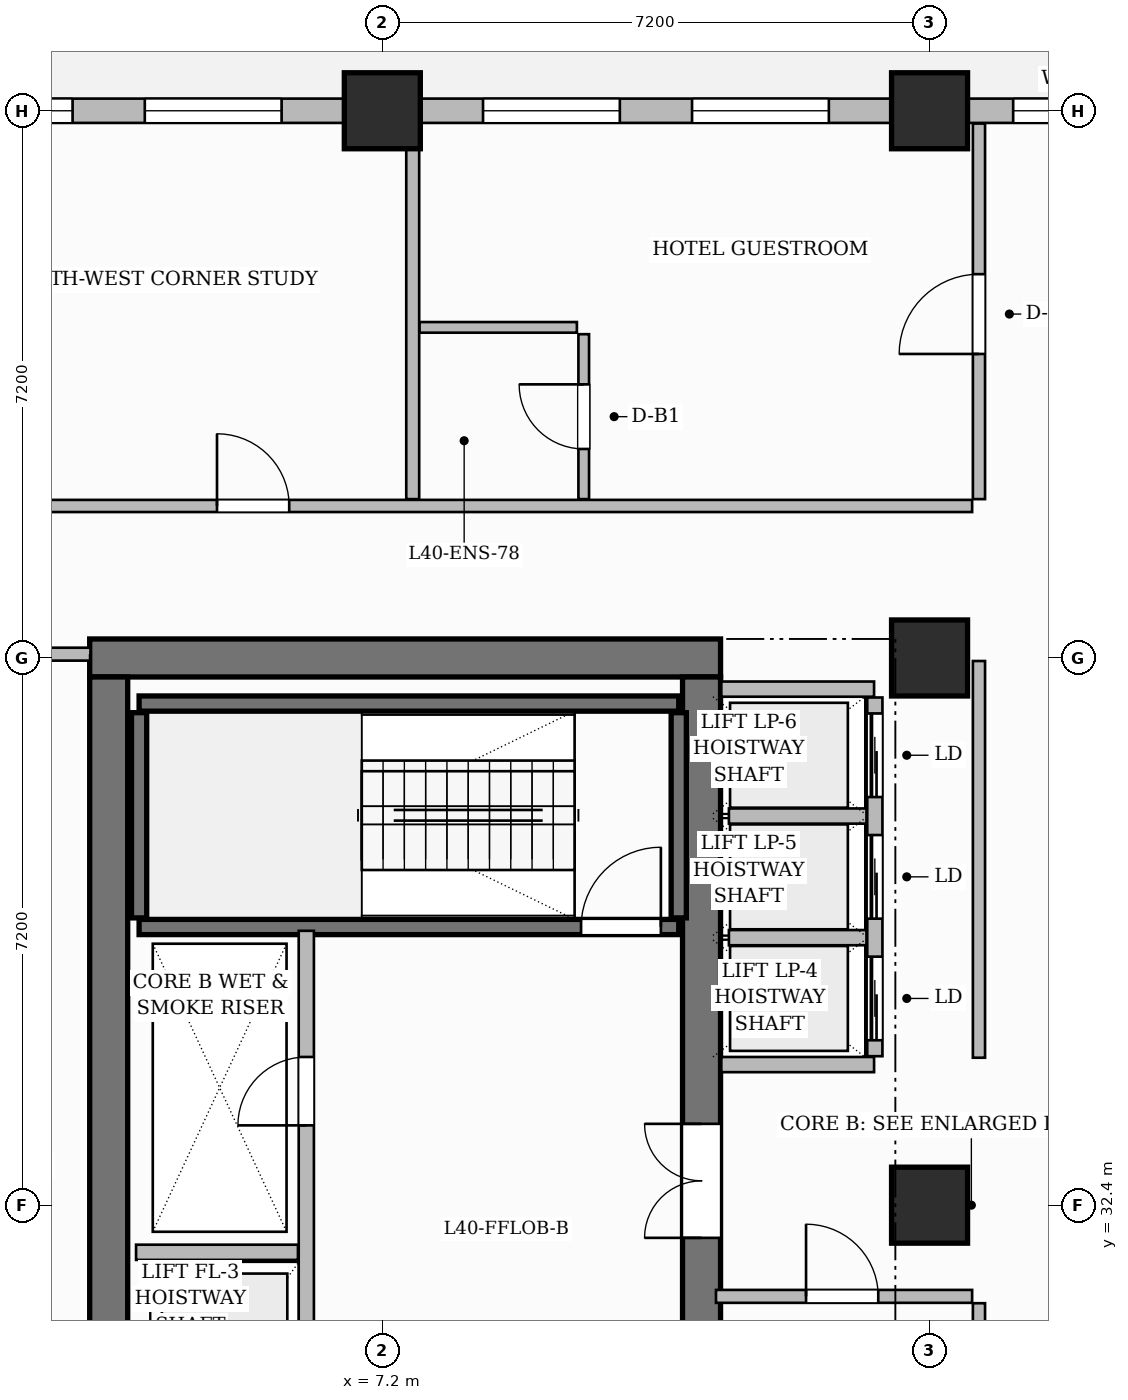
"""IFC4 building model, lengths in metres.
Left out: names, types, materials, properties, quantities, classifications, styles, units other than length and angle.
Written with IfcOpenShell. Run it as: python <this file> out.ifc"""

import sys

from ifc_helpers import new_model, si_unit, direction, frame, frame_2d, origin, origin_2d, place, context, subcontext, project, spatial, rectangle, extrude, source, transform, mapped, element, fill, save


model = new_model("IFC4")
c1 = context("Model", 3, precision=1e-05, world=origin(), true_north=direction((0.0, 1.0)))
c2 = subcontext(c1, "Body", "Model", "MODEL_VIEW")
j1 = project(units=[si_unit("LENGTHUNIT", "METRE"), si_unit("PLANEANGLEUNIT", "RADIAN")], contexts=[c1])
p1 = place(None, origin())
s1 = spatial("IfcSite", under=j1, at=p1, CompositionType="ELEMENT")
p2 = place(p1, origin())
s2 = spatial("IfcBuilding", under=s1, at=p2, CompositionType="ELEMENT")
p3 = place(p2, frame((0.0, 0.0, 161.85)))
s3 = spatial("IfcBuildingStorey", under=s2, at=p3, CompositionType="ELEMENT", Elevation=161.85)
p4 = place(p3, frame((3.35, 39.6, 0.0), z_axis=(0.0, 0.0, 1.0), x_axis=(1.0, 0.0, 0.0)))
e1 = element("IfcWall", 1, at=p4, inside=s3, PredefinedType="SHEAR", context=c2, shape_type="SweptSolid", body=[
    extrude(rectangle(XDim=8.3, YDim=0.5, at=frame_2d((4.15, 0.0))), origin(), (0.0, 0.0, 1.0), 3.85),
])
p5 = place(p3, frame((3.6, 25.45, 0.0), z_axis=(0.0, 0.0, 1.0), x_axis=(0.0, 1.0, 0.0)))
e2 = element("IfcWall", 2, at=p5, inside=s3, PredefinedType="SHEAR", context=c2, shape_type="SweptSolid", body=[
    extrude(rectangle(XDim=13.9, YDim=0.5, at=frame_2d((6.95, 0.0))), origin(), (0.0, 0.0, 1.0), 3.85),
])
p6 = place(p3, frame((11.4, 25.45, 0.0), z_axis=(0.0, 0.0, 1.0), x_axis=(0.0, 1.0, 0.0)))
e3 = element("IfcWall", 3, at=p6, inside=s3, PredefinedType="SHEAR", context=c2, shape_type="SweptSolid", body=[
    extrude(rectangle(XDim=13.9, YDim=0.5, at=frame_2d((6.95, 0.0))), origin(), (0.0, 0.0, 1.0), 3.85),
])
p7 = place(p6, frame((6.52, 0.0, 0.0)))
e4 = element("IfcOpeningElement", 4, at=p7, cuts=e3, PredefinedType="OPENING", context=c2, shape_type="SweptSolid", body=[
    extrude(rectangle(XDim=1.5, YDim=2.2, at=frame_2d((0.75, 1.1))), frame((0.0, 0.26, 0.0), z_axis=(0.0, -1.0, 0.0), x_axis=(1.0, 0.0, 0.0)), (0.0, 0.0, 1.0), 0.52),
])
m1 = source(origin(), c2, "Body", "SweptSolid", [
    extrude(rectangle(XDim=1.0, YDim=1.0, at=origin_2d()), origin(), (0.0, 0.0, 1.0), 3.85),
])
for number, where, z_axis, x_axis in (
    (5, (7.2, 46.8, 0.0), (0.0, 0.0, 1.0), (1.0, 0.0, 0.0)),
    (6, (14.4, 32.4, 0.0), (0.0, 0.0, 1.0), (1.0, 0.0, 0.0)),
    (7, (14.4, 39.6, 0.0), (0.0, 0.0, 1.0), (1.0, 0.0, 0.0)),
    (8, (14.4, 46.8, 0.0), (0.0, 0.0, 1.0), (1.0, 0.0, 0.0)),
):
    element("IfcColumn", number, at=place(p3, frame(where, z_axis=z_axis, x_axis=x_axis)), inside=s3, PredefinedType="COLUMN", context=c2, shape_type="MappedRepresentation", body=[
        mapped(m1, transform((0.0, 0.0, 0.0), scale=1.0)),
    ])
p8 = place(p3, frame((4.0, 39.0, 0.0), z_axis=(0.0, 0.0, 1.0), x_axis=(1.0, 0.0, 0.0)))
e9 = element("IfcWall", 9, at=p8, inside=s3, PredefinedType="SHEAR", context=c2, shape_type="SweptSolid", body=[
    extrude(rectangle(XDim=7.1, YDim=0.2, at=frame_2d((3.55, 0.0))), origin(), (0.0, 0.0, 1.0), 3.85),
])
for number, where, z_axis, x_axis in (
    (10, (4.0, 36.18, 0.0), (0.0, 0.0, 1.0), (0.0, 1.0, 0.0)),
    (11, (11.1, 36.18, 0.0), (0.0, 0.0, 1.0), (0.0, 1.0, 0.0)),
):
    element("IfcWall", number, at=place(p3, frame(where, z_axis=z_axis, x_axis=x_axis)), inside=s3, PredefinedType="SHEAR", context=c2, shape_type="SweptSolid", body=[
        extrude(rectangle(XDim=2.7, YDim=0.2, at=frame_2d((1.35, 0.0))), origin(), (0.0, 0.0, 1.0), 3.85),
    ])
p9 = place(p3, frame((4.0, 36.06, 0.0), z_axis=(0.0, 0.0, 1.0), x_axis=(1.0, 0.0, 0.0)))
e12 = element("IfcWall", 12, at=p9, inside=s3, PredefinedType="SHEAR", context=c2, shape_type="SweptSolid", body=[
    extrude(rectangle(XDim=7.1, YDim=0.2, at=frame_2d((3.55, 0.0))), origin(), (0.0, 0.0, 1.0), 3.85),
])
p10 = place(p9, frame((5.815, 0.0, 0.0)))
e13 = element("IfcOpeningElement", 13, at=p10, cuts=e12, PredefinedType="OPENING", context=c2, shape_type="SweptSolid", body=[
    extrude(rectangle(XDim=1.05, YDim=2.2, at=frame_2d((0.525, 1.1))), frame((0.0, 0.11, 0.0), z_axis=(0.0, -1.0, 0.0), x_axis=(1.0, 0.0, 0.0)), (0.0, 0.0, 1.0), 0.22),
])
p11 = place(p3, frame((6.2, 28.79, 0.0), z_axis=(0.0, 0.0, 1.0), x_axis=(0.0, 1.0, 0.0)))
e14 = element("IfcWall", 14, at=p11, inside=s3, PredefinedType="PARTITIONING", context=c2, shape_type="SweptSolid", body=[
    extrude(rectangle(XDim=7.22, YDim=0.2, at=frame_2d((3.61, 0.0))), origin(), (0.0, 0.0, 1.0), 3.6),
])
p12 = place(p11, frame((4.66, 0.0, 0.0)))
e15 = element("IfcOpeningElement", 15, at=p12, cuts=e14, PredefinedType="OPENING", context=c2, shape_type="SweptSolid", body=[
    extrude(rectangle(XDim=0.9, YDim=2.1, at=frame_2d((0.45, 1.05))), frame((0.0, 0.11, 0.0), z_axis=(0.0, -1.0, 0.0), x_axis=(1.0, 0.0, 0.0)), (0.0, 0.0, 1.0), 0.22),
])
p13 = place(p11, frame((0.96, 0.0, 0.0)))
e16 = element("IfcOpeningElement", 16, at=p13, cuts=e14, PredefinedType="OPENING", context=c2, shape_type="SweptSolid", body=[
    extrude(rectangle(XDim=1.1, YDim=2.2, at=frame_2d((0.55, 1.1))), frame((0.0, 0.11, 0.0), z_axis=(0.0, -1.0, 0.0), x_axis=(1.0, 0.0, 0.0)), (0.0, 0.0, 1.0), 0.22),
])
p14 = place(p3, frame((3.96, 31.78, 0.0), z_axis=(0.0, 0.0, 1.0), x_axis=(1.0, 0.0, 0.0)))
e17 = element("IfcWall", 17, at=p14, inside=s3, PredefinedType="PARTITIONING", context=c2, shape_type="SweptSolid", body=[
    extrude(rectangle(XDim=2.13, YDim=0.2, at=frame_2d((1.065, 0.0))), origin(), (0.0, 0.0, 1.0), 3.6),
])
for number, where, z_axis, x_axis in (
    (18, (11.66, 34.25, 0.0), (0.0, 0.0, 1.0), (1.0, 0.0, 0.0)),
    (19, (11.66, 39.19, 0.0), (0.0, 0.0, 1.0), (1.0, 0.0, 0.0)),
):
    element("IfcWall", number, at=place(p3, frame(where, z_axis=z_axis, x_axis=x_axis)), inside=s3, PredefinedType="PARTITIONING", context=c2, shape_type="SweptSolid", body=[
        extrude(rectangle(XDim=2.01, YDim=0.2, at=frame_2d((1.005, 0.0))), origin(), (0.0, 0.0, 1.0), 3.6),
    ])
p15 = place(p3, frame((13.68, 34.36, 0.0), z_axis=(0.0, 0.0, 1.0), x_axis=(0.0, 1.0, 0.0)))
e20 = element("IfcWall", 20, at=p15, inside=s3, PredefinedType="PARTITIONING", context=c2, shape_type="SweptSolid", body=[
    extrude(rectangle(XDim=4.72, YDim=0.2, at=frame_2d((2.36, 0.0))), origin(), (0.0, 0.0, 1.0), 3.6),
])
p16 = place(p15, frame((0.21, 0.0, 0.0)))
e21 = element("IfcOpeningElement", 21, at=p16, cuts=e20, PredefinedType="OPENING", context=c2, shape_type="SweptSolid", body=[
    extrude(rectangle(XDim=1.1, YDim=2.2, at=frame_2d((0.55, 1.1))), frame((0.0, 0.11, 0.0), z_axis=(0.0, -1.0, 0.0), x_axis=(1.0, 0.0, 0.0)), (0.0, 0.0, 1.0), 0.22),
])
p17 = place(p15, frame((1.81, 0.0, 0.0)))
e22 = element("IfcOpeningElement", 22, at=p17, cuts=e20, PredefinedType="OPENING", context=c2, shape_type="SweptSolid", body=[
    extrude(rectangle(XDim=1.1, YDim=2.2, at=frame_2d((0.55, 1.1))), frame((0.0, 0.11, 0.0), z_axis=(0.0, -1.0, 0.0), x_axis=(1.0, 0.0, 0.0)), (0.0, 0.0, 1.0), 0.22),
])
p18 = place(p15, frame((3.41, 0.0, 0.0)))
e23 = element("IfcOpeningElement", 23, at=p18, cuts=e20, PredefinedType="OPENING", context=c2, shape_type="SweptSolid", body=[
    extrude(rectangle(XDim=1.1, YDim=2.2, at=frame_2d((0.55, 1.1))), frame((0.0, 0.11, 0.0), z_axis=(0.0, -1.0, 0.0), x_axis=(1.0, 0.0, 0.0)), (0.0, 0.0, 1.0), 0.22),
])
for number, where, z_axis, x_axis in (
    (24, (11.76, 35.92, 0.0), (0.0, 0.0, 1.0), (1.0, 0.0, 0.0)),
    (25, (11.76, 37.52, 0.0), (0.0, 0.0, 1.0), (1.0, 0.0, 0.0)),
):
    element("IfcWall", number, at=place(p3, frame(where, z_axis=z_axis, x_axis=x_axis)), inside=s3, PredefinedType="PARTITIONING", context=c2, shape_type="SweptSolid", body=[
        extrude(rectangle(XDim=1.81, YDim=0.2, at=frame_2d((0.905, 0.0))), origin(), (0.0, 0.0, 1.0), 3.6),
    ])
p19 = place(p3, frame((0.24, 39.65, 0.0), z_axis=(0.0, 0.0, 1.0), x_axis=(1.0, 0.0, 0.0)))
e26 = element("IfcWall", 26, at=p19, inside=s3, PredefinedType="PARTITIONING", context=c2, shape_type="SweptSolid", body=[
    extrude(rectangle(XDim=3.12, YDim=0.17, at=frame_2d((1.56, 0.0))), origin(), (0.0, 0.0, 1.0), 3.6),
])
p20 = place(p19, frame((1.11, 0.0, 0.0)))
e27 = element("IfcOpeningElement", 27, at=p20, cuts=e26, PredefinedType="OPENING", context=c2, shape_type="SweptSolid", body=[
    extrude(rectangle(XDim=0.9, YDim=2.15, at=frame_2d((0.45, 1.075))), frame((0.0, 0.095, 0.0), z_axis=(0.0, -1.0, 0.0), x_axis=(1.0, 0.0, 0.0)), (0.0, 0.0, 1.0), 0.19),
])
p21 = place(p3, frame((15.05, 34.34, 0.0), z_axis=(0.0, 0.0, 1.0), x_axis=(0.0, 1.0, 0.0)))
e28 = element("IfcWall", 28, at=p21, inside=s3, PredefinedType="PARTITIONING", context=c2, shape_type="SweptSolid", body=[
    extrude(rectangle(XDim=5.22, YDim=0.16, at=frame_2d((2.61, 0.0))), origin(), (0.0, 0.0, 1.0), 3.6),
])
p22 = place(p3, frame((15.05, 41.69, 0.0), z_axis=(0.0, 0.0, 1.0), x_axis=(0.0, 1.0, 0.0)))
e29 = element("IfcWall", 29, at=p22, inside=s3, PredefinedType="PARTITIONING", context=c2, shape_type="SweptSolid", body=[
    extrude(rectangle(XDim=4.942, YDim=0.16, at=frame_2d((2.471, 0.0))), origin(), (0.0, 0.0, 1.0), 3.6),
])
p23 = place(p22, frame((1.91, 0.0, 0.0)))
e30 = element("IfcOpeningElement", 30, at=p23, cuts=e29, PredefinedType="OPENING", context=c2, shape_type="SweptSolid", body=[
    extrude(rectangle(XDim=1.05, YDim=2.25, at=frame_2d((0.525, 1.125))), frame((0.0, 0.09, 0.0), z_axis=(0.0, -1.0, 0.0), x_axis=(1.0, 0.0, 0.0)), (0.0, 0.0, 1.0), 0.18),
])
p24 = place(p3, frame((7.6, 41.69, 0.0), z_axis=(0.0, 0.0, 1.0), x_axis=(0.0, 1.0, 0.0)))
e31 = element("IfcWall", 31, at=p24, inside=s3, PredefinedType="PARTITIONING", context=c2, shape_type="SweptSolid", body=[
    extrude(rectangle(XDim=4.87, YDim=0.17, at=frame_2d((2.435, 0.0))), origin(), (0.0, 0.0, 1.0), 3.6),
])
p25 = place(p3, frame((0.168, 41.6, 0.0), z_axis=(0.0, 0.0, 1.0), x_axis=(1.0, 0.0, 0.0)))
e32 = element("IfcWall", 32, at=p25, inside=s3, PredefinedType="PARTITIONING", context=c2, shape_type="SweptSolid", body=[
    extrude(rectangle(XDim=14.792, YDim=0.16, at=frame_2d((7.396, 0.0))), origin(), (0.0, 0.0, 1.0), 3.085),
])
p26 = place(p25, frame((4.857, 0.0, 0.0)))
e33 = element("IfcOpeningElement", 33, at=p26, cuts=e32, PredefinedType="OPENING", context=c2, shape_type="SweptSolid", body=[
    extrude(rectangle(XDim=0.95, YDim=2.15, at=frame_2d((0.475, 1.075))), frame((0.0, 0.09, 0.0), z_axis=(0.0, -1.0, 0.0), x_axis=(1.0, 0.0, 0.0)), (0.0, 0.0, 1.0), 0.18),
])
p27 = place(p3, frame((7.69, 43.95, 0.0), z_axis=(0.0, 0.0, 1.0), x_axis=(1.0, 0.0, 0.0)))
e34 = element("IfcWall", 34, at=p27, inside=s3, PredefinedType="PARTITIONING", context=c2, shape_type="SweptSolid", body=[
    extrude(rectangle(XDim=2.07, YDim=0.14, at=frame_2d((1.035, 0.0))), origin(), (0.0, 0.0, 1.0), 3.085),
])
p28 = place(p3, frame((9.85, 41.69, 0.0), z_axis=(0.0, 0.0, 1.0), x_axis=(0.0, 1.0, 0.0)))
e35 = element("IfcWall", 35, at=p28, inside=s3, PredefinedType="PARTITIONING", context=c2, shape_type="SweptSolid", body=[
    extrude(rectangle(XDim=2.17, YDim=0.14, at=frame_2d((1.085, 0.0))), origin(), (0.0, 0.0, 1.0), 3.6),
])
p29 = place(p28, frame((0.66, 0.0, 0.0)))
e36 = element("IfcOpeningElement", 36, at=p29, cuts=e35, PredefinedType="OPENING", context=c2, shape_type="SweptSolid", body=[
    extrude(rectangle(XDim=0.85, YDim=2.1, at=frame_2d((0.425, 1.05))), frame((0.0, 0.08, 0.0), z_axis=(0.0, -1.0, 0.0), x_axis=(1.0, 0.0, 0.0)), (0.0, 0.0, 1.0), 0.16),
])
p30 = place(p3, frame((15.05, 25.39, 0.0), z_axis=(0.0, 0.0, 1.0), x_axis=(0.0, 1.0, 0.0)))
e37 = element("IfcWall", 37, at=p30, inside=s3, PredefinedType="PARTITIONING", context=c2, shape_type="SweptSolid", body=[
    extrude(rectangle(XDim=5.72, YDim=0.16, at=frame_2d((2.86, 0.0))), origin(), (0.0, 0.0, 1.0), 3.6),
])
p31 = place(p3, frame((11.59, 31.2, 0.0), z_axis=(0.0, 0.0, 1.0), x_axis=(1.0, 0.0, 0.0)))
e38 = element("IfcWall", 38, at=p31, inside=s3, PredefinedType="PARTITIONING", context=c2, shape_type="SweptSolid", body=[
    extrude(rectangle(XDim=3.37, YDim=0.17, at=frame_2d((1.685, 0.0))), origin(), (0.0, 0.0, 1.0), 3.6),
])
p32 = place(p31, frame((1.185, 0.0, 0.0)))
e39 = element("IfcOpeningElement", 39, at=p32, cuts=e38, PredefinedType="OPENING", context=c2, shape_type="SweptSolid", body=[
    extrude(rectangle(XDim=0.95, YDim=2.15, at=frame_2d((0.475, 1.075))), frame((0.0, 0.095, 0.0), z_axis=(0.0, -1.0, 0.0), x_axis=(1.0, 0.0, 0.0)), (0.0, 0.0, 1.0), 0.19),
])
p33 = place(p3, frame((0.0, 46.8, 0.0), z_axis=(0.0, 0.0, 1.0), x_axis=(1.0, 0.0, 0.0)))
e40 = element("IfcWall", 40, at=p33, inside=s3, PredefinedType="SOLIDWALL", context=c2, shape_type="SweptSolid", body=[
    extrude(rectangle(XDim=18.0, YDim=0.32, at=frame_2d((9.0, 0.0))), origin(), (0.0, 0.0, 1.0), 3.085),
])
p34 = place(p33, frame((1.325, 0.0, 0.8)))
e41 = element("IfcOpeningElement", 41, at=p34, cuts=e40, PredefinedType="OPENING", context=c2, shape_type="SweptSolid", body=[
    extrude(rectangle(XDim=1.8, YDim=1.85, at=frame_2d((0.9, 0.925))), frame((0.0, 0.17, 0.0), z_axis=(0.0, -1.0, 0.0), x_axis=(1.0, 0.0, 0.0)), (0.0, 0.0, 1.0), 0.34),
])
p35 = place(p33, frame((4.075, 0.0, 0.8)))
e42 = element("IfcOpeningElement", 42, at=p35, cuts=e40, PredefinedType="OPENING", context=c2, shape_type="SweptSolid", body=[
    extrude(rectangle(XDim=1.8, YDim=1.85, at=frame_2d((0.9, 0.925))), frame((0.0, 0.17, 0.0), z_axis=(0.0, -1.0, 0.0), x_axis=(1.0, 0.0, 0.0)), (0.0, 0.0, 1.0), 0.34),
])
p36 = place(p33, frame((8.525, 0.0, 0.8)))
e43 = element("IfcOpeningElement", 43, at=p36, cuts=e40, PredefinedType="OPENING", context=c2, shape_type="SweptSolid", body=[
    extrude(rectangle(XDim=1.8, YDim=1.85, at=frame_2d((0.9, 0.925))), frame((0.0, 0.17, 0.0), z_axis=(0.0, -1.0, 0.0), x_axis=(1.0, 0.0, 0.0)), (0.0, 0.0, 1.0), 0.34),
])
p37 = place(p33, frame((11.275, 0.0, 0.8)))
e44 = element("IfcOpeningElement", 44, at=p37, cuts=e40, PredefinedType="OPENING", context=c2, shape_type="SweptSolid", body=[
    extrude(rectangle(XDim=1.8, YDim=1.85, at=frame_2d((0.9, 0.925))), frame((0.0, 0.17, 0.0), z_axis=(0.0, -1.0, 0.0), x_axis=(1.0, 0.0, 0.0)), (0.0, 0.0, 1.0), 0.34),
])
p38 = place(p33, frame((15.5, 0.0, 0.8)))
e45 = element("IfcOpeningElement", 45, at=p38, cuts=e40, PredefinedType="OPENING", context=c2, shape_type="SweptSolid", body=[
    extrude(rectangle(XDim=1.4, YDim=1.85, at=frame_2d((0.7, 0.925))), frame((0.0, 0.17, 0.0), z_axis=(0.0, -1.0, 0.0), x_axis=(1.0, 0.0, 0.0)), (0.0, 0.0, 1.0), 0.34),
])
m2 = source(origin(), c2, "Body", "SweptSolid", [
    extrude(rectangle(XDim=1.05, YDim=2.2, at=frame_2d((0.525, 1.1))), frame((0.0, 0.025, 0.0), z_axis=(0.0, -1.0, 0.0), x_axis=(1.0, 0.0, 0.0)), (0.0, 0.0, 1.0), 0.05),
])
p39 = place(p10, origin())
e46 = element("IfcDoor", 46, at=p39, inside=s3, OperationType="SINGLE_SWING_RIGHT", PredefinedType="DOOR", context=c2, shape_type="MappedRepresentation", body=[
    mapped(m2, transform((0.0, 0.0, 0.0), scale=1.0)),
])
fill(e13, e46)
m3 = source(origin(), c2, "Body", "SweptSolid", [
    extrude(rectangle(XDim=0.9, YDim=2.1, at=frame_2d((0.45, 1.05))), frame((0.0, 0.025, 0.0), z_axis=(0.0, -1.0, 0.0), x_axis=(1.0, 0.0, 0.0)), (0.0, 0.0, 1.0), 0.05),
])
p40 = place(p12, origin())
e47 = element("IfcDoor", 47, at=p40, inside=s3, OperationType="SINGLE_SWING_LEFT", PredefinedType="DOOR", context=c2, shape_type="MappedRepresentation", body=[
    mapped(m3, transform((0.0, 0.0, 0.0), scale=1.0)),
])
fill(e15, e47)
m4 = source(origin(), c2, "Body", "SweptSolid", [
    extrude(rectangle(XDim=1.5, YDim=2.2, at=frame_2d((0.75, 1.1))), frame((0.0, 0.025, 0.0), z_axis=(0.0, -1.0, 0.0), x_axis=(1.0, 0.0, 0.0)), (0.0, 0.0, 1.0), 0.05),
])
p41 = place(p7, origin())
e48 = element("IfcDoor", 48, at=p41, inside=s3, OperationType="DOUBLE_DOOR_SINGLE_SWING", PredefinedType="DOOR", context=c2, shape_type="MappedRepresentation", body=[
    mapped(m4, transform((0.0, 0.0, 0.0), scale=1.0)),
])
fill(e4, e48)
m5 = source(origin(), c2, "Body", "SweptSolid", [
    extrude(rectangle(XDim=0.95, YDim=2.15, at=frame_2d((0.475, 1.075))), frame((0.0, 0.025, 0.0), z_axis=(0.0, -1.0, 0.0), x_axis=(1.0, 0.0, 0.0)), (0.0, 0.0, 1.0), 0.05),
])
p42 = place(p26, origin())
e49 = element("IfcDoor", 49, at=p42, inside=s3, OperationType="SINGLE_SWING_LEFT", PredefinedType="DOOR", context=c2, shape_type="MappedRepresentation", body=[
    mapped(m5, transform((0.0, 0.0, 0.0), scale=1.0)),
])
fill(e33, e49)
m6 = source(origin(), c2, "Body", "SweptSolid", [
    extrude(rectangle(XDim=0.85, YDim=2.1, at=frame_2d((0.425, 1.05))), frame((0.0, 0.025, 0.0), z_axis=(0.0, -1.0, 0.0), x_axis=(1.0, 0.0, 0.0)), (0.0, 0.0, 1.0), 0.05),
])
p43 = place(p29, origin())
e50 = element("IfcDoor", 50, at=p43, inside=s3, OperationType="SINGLE_SWING_RIGHT", PredefinedType="DOOR", context=c2, shape_type="MappedRepresentation", body=[
    mapped(m6, transform((0.0, 0.0, 0.0), scale=1.0)),
])
fill(e36, e50)
m7 = source(origin(), c2, "Body", "SweptSolid", [
    extrude(rectangle(XDim=1.05, YDim=2.25, at=frame_2d((0.525, 1.125))), frame((0.0, 0.025, 0.0), z_axis=(0.0, -1.0, 0.0), x_axis=(1.0, 0.0, 0.0)), (0.0, 0.0, 1.0), 0.05),
])
p44 = place(p23, origin())
e51 = element("IfcDoor", 51, at=p44, inside=s3, OperationType="SINGLE_SWING_LEFT", PredefinedType="DOOR", context=c2, shape_type="MappedRepresentation", body=[
    mapped(m7, transform((0.0, 0.0, 0.0), scale=1.0)),
])
fill(e30, e51)
p45 = place(p32, origin())
e52 = element("IfcDoor", 52, at=p45, inside=s3, OperationType="SINGLE_SWING_LEFT", PredefinedType="DOOR", context=c2, shape_type="MappedRepresentation", body=[
    mapped(m5, transform((0.0, 0.0, 0.0), scale=1.0)),
])
fill(e39, e52)
m8 = source(origin(), c2, "Body", "SweptSolid", [
    extrude(rectangle(XDim=1.1, YDim=2.2, at=frame_2d((0.55, 1.1))), frame((0.0, 0.025, 0.0), z_axis=(0.0, -1.0, 0.0), x_axis=(1.0, 0.0, 0.0)), (0.0, 0.0, 1.0), 0.05),
])
p46 = place(p16, origin())
e53 = element("IfcDoor", 53, at=p46, inside=s3, OperationType="SLIDING_TO_LEFT", PredefinedType="DOOR", context=c2, shape_type="MappedRepresentation", body=[
    mapped(m8, transform((0.0, 0.0, 0.0), scale=1.0)),
])
fill(e21, e53)
p47 = place(p17, origin())
e54 = element("IfcDoor", 54, at=p47, inside=s3, OperationType="SLIDING_TO_LEFT", PredefinedType="DOOR", context=c2, shape_type="MappedRepresentation", body=[
    mapped(m8, transform((0.0, 0.0, 0.0), scale=1.0)),
])
fill(e22, e54)
p48 = place(p18, origin())
e55 = element("IfcDoor", 55, at=p48, inside=s3, OperationType="SLIDING_TO_LEFT", PredefinedType="DOOR", context=c2, shape_type="MappedRepresentation", body=[
    mapped(m8, transform((0.0, 0.0, 0.0), scale=1.0)),
])
fill(e23, e55)
m9 = source(origin(), c2, "Body", "SweptSolid", [
    extrude(rectangle(XDim=1.8, YDim=1.85, at=frame_2d((0.9, 0.925))), frame((0.0, 0.03, 0.0), z_axis=(0.0, -1.0, 0.0), x_axis=(1.0, 0.0, 0.0)), (0.0, 0.0, 1.0), 0.06),
])
p49 = place(p34, origin())
e56 = element("IfcWindow", 56, at=p49, inside=s3, PartitioningType="DOUBLE_PANEL_VERTICAL", PredefinedType="WINDOW", context=c2, shape_type="MappedRepresentation", body=[
    mapped(m9, transform((0.0, 0.0, 0.0), scale=1.0)),
])
fill(e41, e56)
p50 = place(p35, origin())
e57 = element("IfcWindow", 57, at=p50, inside=s3, PartitioningType="DOUBLE_PANEL_VERTICAL", PredefinedType="WINDOW", context=c2, shape_type="MappedRepresentation", body=[
    mapped(m9, transform((0.0, 0.0, 0.0), scale=1.0)),
])
fill(e42, e57)
p51 = place(p36, origin())
e58 = element("IfcWindow", 58, at=p51, inside=s3, PartitioningType="DOUBLE_PANEL_VERTICAL", PredefinedType="WINDOW", context=c2, shape_type="MappedRepresentation", body=[
    mapped(m9, transform((0.0, 0.0, 0.0), scale=1.0)),
])
fill(e43, e58)
p52 = place(p37, origin())
e59 = element("IfcWindow", 59, at=p52, inside=s3, PartitioningType="DOUBLE_PANEL_VERTICAL", PredefinedType="WINDOW", context=c2, shape_type="MappedRepresentation", body=[
    mapped(m9, transform((0.0, 0.0, 0.0), scale=1.0)),
])
fill(e44, e59)
m10 = source(origin(), c2, "Body", "SweptSolid", [
    extrude(rectangle(XDim=1.4, YDim=1.85, at=frame_2d((0.7, 0.925))), frame((0.0, 0.03, 0.0), z_axis=(0.0, -1.0, 0.0), x_axis=(1.0, 0.0, 0.0)), (0.0, 0.0, 1.0), 0.06),
])
p53 = place(p38, origin())
e60 = element("IfcWindow", 60, at=p53, inside=s3, PartitioningType="SINGLE_PANEL", PredefinedType="WINDOW", context=c2, shape_type="MappedRepresentation", body=[
    mapped(m10, transform((0.0, 0.0, 0.0), scale=1.0)),
])
fill(e45, e60)
save(model, sys.argv[1])
